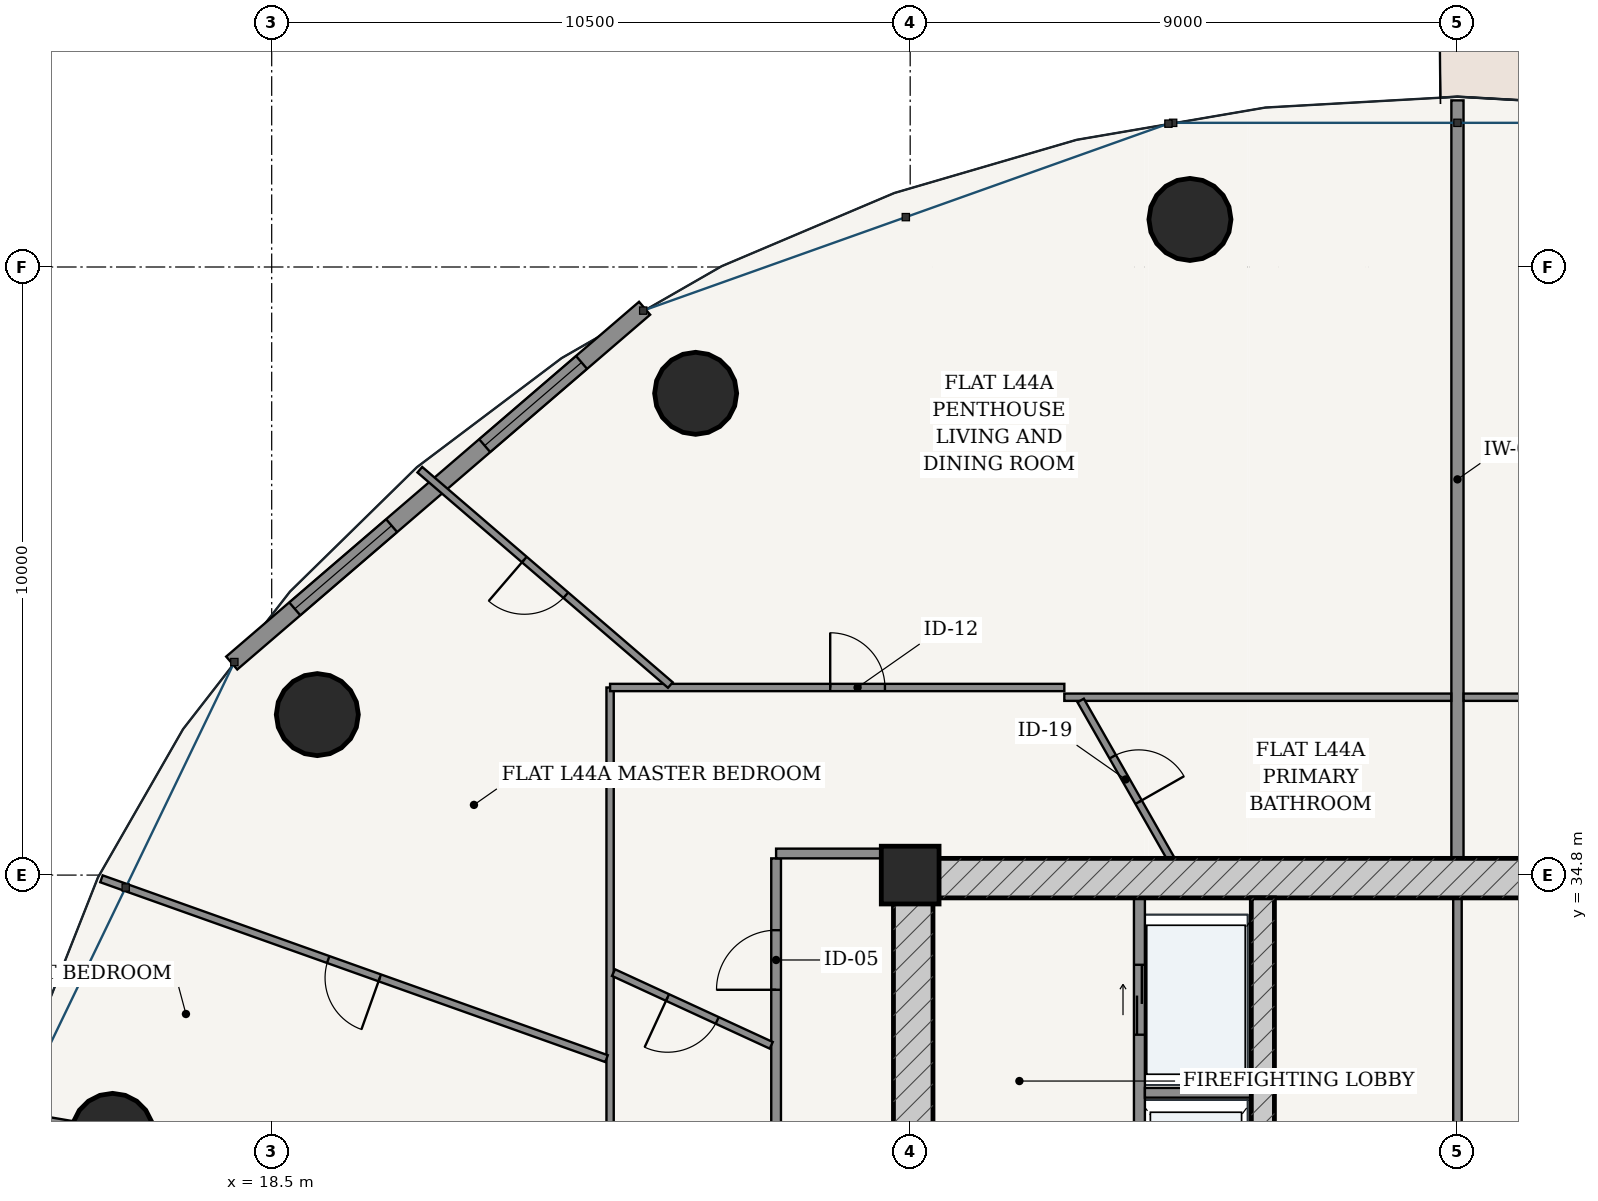
"""IFC4 building model, lengths in metres.
Left out: names, types, materials, properties, quantities, classifications, styles, units other than length and angle.
Written with IfcOpenShell. Run it as: python <this file> out.ifc"""

import sys

from ifc_helpers import new_model, si_unit, direction, frame, frame_2d, origin, origin_2d, place, context, subcontext, project, spatial, rectangle, hollow_circle, extrude, source, transform, mapped, element, fill, save


model = new_model("IFC4")
c1 = context("Model", 3, precision=1e-05, world=origin(), true_north=direction((-0.2419218956, 0.970295726276)))
c2 = subcontext(c1, "Body", "Model", "MODEL_VIEW")
j1 = project(units=[si_unit("LENGTHUNIT", "METRE"), si_unit("PLANEANGLEUNIT", "RADIAN")], contexts=[c1])
p1 = place(None, origin())
s1 = spatial("IfcSite", under=j1, at=p1, CompositionType="ELEMENT")
p2 = place(p1, origin())
s2 = spatial("IfcBuilding", under=s1, at=p2, CompositionType="ELEMENT")
p3 = place(p2, frame((0.0, 0.0, 167.8)))
s3 = spatial("IfcBuildingStorey", under=s2, at=p3, CompositionType="ELEMENT", Elevation=167.8)
p4 = place(p3, frame((29.0, 34.8, 0.0), z_axis=(0.0, 0.0, 1.0), x_axis=(1.0, 0.0, 0.0)))
e1 = element("IfcColumn", 1, at=p4, inside=s3, PredefinedType="COLUMN", context=c2, shape_type="SweptSolid", body=[
    extrude(rectangle(XDim=0.95, YDim=0.95, at=origin_2d()), origin(), (0.0, 0.0, 1.0), 3.6),
])
p5 = place(p3, frame((28.725, 34.75, 0.0), z_axis=(0.0, 0.0, 1.0), x_axis=(1.0, 0.0, 0.0)))
e2 = element("IfcWall", 2, at=p5, inside=s3, PredefinedType="SHEAR", context=c2, shape_type="SweptSolid", body=[
    extrude(rectangle(XDim=18.55, YDim=0.65, at=frame_2d((9.275, 0.0))), origin(), (0.0, 0.0, 1.0), 3.33),
])
p6 = place(p3, frame((29.05, 19.175, 0.0), z_axis=(0.0, 0.0, 1.0), x_axis=(0.0, 1.0, 0.0)))
e3 = element("IfcWall", 3, at=p6, inside=s3, PredefinedType="SHEAR", context=c2, shape_type="SweptSolid", body=[
    extrude(rectangle(XDim=15.25, YDim=0.65, at=frame_2d((7.625, 0.0))), origin(), (0.0, 0.0, 1.0), 3.33),
])
p7 = place(p6, frame((9.875, 0.0, 0.0)))
e4 = element("IfcOpeningElement", 4, at=p7, cuts=e3, PredefinedType="OPENING", context=c2, shape_type="SweptSolid", body=[
    extrude(rectangle(XDim=1.5, YDim=2.2, at=frame_2d((0.75, 1.1))), frame((0.0, 0.335, 0.0), z_axis=(0.0, -1.0, 0.0), x_axis=(1.0, 0.0, 0.0)), (0.0, 0.0, 1.0), 0.67),
])
p8 = place(p3, frame((34.8, 19.175, 0.0), z_axis=(0.0, 0.0, 1.0), x_axis=(0.0, 1.0, 0.0)))
e5 = element("IfcWall", 5, at=p8, inside=s3, PredefinedType="SHEAR", context=c2, shape_type="SweptSolid", body=[
    extrude(rectangle(XDim=15.25, YDim=0.38, at=frame_2d((7.625, 0.0))), origin(), (0.0, 0.0, 1.0), 3.33),
])
p9 = place(p8, frame((7.8, 0.0, 0.0)))
e6 = element("IfcOpeningElement", 6, at=p9, cuts=e5, PredefinedType="OPENING", context=c2, shape_type="SweptSolid", body=[
    extrude(rectangle(XDim=1.05, YDim=2.15, at=frame_2d((0.525, 1.075))), frame((0.0, 0.2, 0.0), z_axis=(0.0, -1.0, 0.0), x_axis=(1.0, 0.0, 0.0)), (0.0, 0.0, 1.0), 0.4),
])
for number, where, z_axis, x_axis in (
    (7, (33.601, 45.582, 0.0), (0.0, 0.0, 1.0), (1.0, 0.0, 0.0)),
    (8, (25.472, 42.723, 0.0), (0.0, 0.0, 1.0), (1.0, 0.0, 0.0)),
    (9, (19.25, 37.439, 0.0), (0.0, 0.0, 1.0), (1.0, 0.0, 0.0)),
    (10, (15.883, 30.536, 0.0), (0.0, 0.0, 1.0), (1.0, 0.0, 0.0)),
):
    element("IfcColumn", number, at=place(p3, frame(where, z_axis=z_axis, x_axis=x_axis)), inside=s3, PredefinedType="COLUMN", context=c2, shape_type="SweptSolid", body=[
        extrude(hollow_circle(Radius=0.675, WallThickness=0.042, at=origin_2d()), origin(), (0.0, 0.0, 1.0), 3.6),
    ])
p10 = place(p3, frame((24.633, 44.122, 0.0), z_axis=(0.0, 0.0, 1.0), x_axis=(-0.75843401647, -0.651749831348, 0.0)))
e11 = element("IfcWall", 11, at=p10, inside=s3, PredefinedType="SOLIDWALL", context=c2, shape_type="SweptSolid", body=[
    extrude(rectangle(XDim=8.952, YDim=0.28, at=frame_2d((4.476, 0.0))), origin(), (0.0, 0.0, 1.0), 3.33),
])
p11 = place(p10, frame((1.367, 0.0, 0.85)))
e12 = element("IfcOpeningElement", 12, at=p11, cuts=e11, PredefinedType="OPENING", context=c2, shape_type="SweptSolid", body=[
    extrude(rectangle(XDim=2.1, YDim=1.95, at=frame_2d((1.05, 0.975))), frame((0.0, 0.15, 0.0), z_axis=(0.0, -1.0, 0.0), x_axis=(1.0, 0.0, 0.0)), (0.0, 0.0, 1.0), 0.3),
])
p12 = place(p10, frame((5.485, 0.0, 0.85)))
e13 = element("IfcOpeningElement", 13, at=p12, cuts=e11, PredefinedType="OPENING", context=c2, shape_type="SweptSolid", body=[
    extrude(rectangle(XDim=2.1, YDim=1.95, at=frame_2d((1.05, 0.975))), frame((0.0, 0.15, 0.0), z_axis=(0.0, -1.0, 0.0), x_axis=(1.0, 0.0, 0.0)), (0.0, 0.0, 1.0), 0.3),
])
p13 = place(p3, frame((32.77, 28.52, 0.0), z_axis=(0.0, 0.0, 1.0), x_axis=(0.0, 1.0, 0.0)))
e14 = element("IfcWall", 14, at=p13, inside=s3, PredefinedType="PARTITIONING", context=c2, shape_type="SweptSolid", body=[
    extrude(rectangle(XDim=5.905, YDim=0.18, at=frame_2d((2.953, 0.0))), origin(), (0.0, 0.0, 1.0), 3.33),
])
p14 = place(p13, frame((3.655, 0.0, 0.0)))
e15 = element("IfcOpeningElement", 15, at=p14, cuts=e14, PredefinedType="OPENING", context=c2, shape_type="SweptSolid", body=[
    extrude(rectangle(XDim=1.15, YDim=2.2, at=frame_2d((0.575, 1.1))), frame((0.0, 0.1, 0.0), z_axis=(0.0, -1.0, 0.0), x_axis=(1.0, 0.0, 0.0)), (0.0, 0.0, 1.0), 0.2),
])
p15 = place(p13, frame((0.73, 0.0, 0.0)))
e16 = element("IfcOpeningElement", 16, at=p15, cuts=e14, PredefinedType="OPENING", context=c2, shape_type="SweptSolid", body=[
    extrude(rectangle(XDim=1.2, YDim=2.25, at=frame_2d((0.6, 1.125))), frame((0.0, 0.1, 0.0), z_axis=(0.0, -1.0, 0.0), x_axis=(1.0, 0.0, 0.0)), (0.0, 0.0, 1.0), 0.2),
])
p16 = place(p3, frame((32.86, 31.22, 0.0), z_axis=(0.0, 0.0, 1.0), x_axis=(1.0, 0.0, 0.0)))
e17 = element("IfcWall", 17, at=p16, inside=s3, PredefinedType="PARTITIONING", context=c2, shape_type="SweptSolid", body=[
    extrude(rectangle(XDim=1.75, YDim=0.16, at=frame_2d((0.875, 0.0))), origin(), (0.0, 0.0, 1.0), 3.33),
])
p17 = place(p3, frame((38.0, 28.56, 0.0), z_axis=(0.0, 0.0, 1.0), x_axis=(0.0, 1.0, 0.0)))
e18 = element("IfcWall", 18, at=p17, inside=s3, PredefinedType="PARTITIONING", context=c2, shape_type="SweptSolid", body=[
    extrude(rectangle(XDim=5.865, YDim=0.14, at=frame_2d((2.933, 0.0))), origin(), (0.0, 0.0, 1.0), 3.33),
])
p18 = place(p3, frame((26.795, 24.4, 0.0), z_axis=(0.0, 0.0, 1.0), x_axis=(0.0, 1.0, 0.0)))
e19 = element("IfcWall", 19, at=p18, inside=s3, PredefinedType="PARTITIONING", context=c2, shape_type="SweptSolid", body=[
    extrude(rectangle(XDim=10.675, YDim=0.16, at=frame_2d((5.337, 0.0))), origin(), (0.0, 0.0, 1.0), 2.776),
])
p19 = place(p18, frame((8.514, 0.0, 0.0)))
e20 = element("IfcOpeningElement", 20, at=p19, cuts=e19, PredefinedType="OPENING", context=c2, shape_type="SweptSolid", body=[
    extrude(rectangle(XDim=0.98, YDim=2.2, at=frame_2d((0.49, 1.1))), frame((0.0, 0.09, 0.0), z_axis=(0.0, -1.0, 0.0), x_axis=(1.0, 0.0, 0.0)), (0.0, 0.0, 1.0), 0.18),
])
p20 = place(p3, frame((26.795, 35.155, 0.0), z_axis=(0.0, 0.0, 1.0), x_axis=(1.0, 0.0, 0.0)))
e21 = element("IfcWall", 21, at=p20, inside=s3, PredefinedType="PARTITIONING", context=c2, shape_type="SweptSolid", body=[
    extrude(rectangle(XDim=1.93, YDim=0.16, at=frame_2d((0.965, 0.0))), origin(), (0.0, 0.0, 1.0), 2.776),
])
p21 = place(p3, frame((38.0, 35.075, 0.0), z_axis=(0.0, 0.0, 1.0), x_axis=(0.0, 1.0, 0.0)))
e22 = element("IfcWall", 22, at=p21, inside=s3, PredefinedType="PARTITIONING", context=c2, shape_type="SweptSolid", body=[
    extrude(rectangle(XDim=12.465, YDim=0.2, at=frame_2d((6.232, 0.0))), origin(), (0.0, 0.0, 1.0), 2.415),
])
p22 = place(p3, frame((24.065, 21.59, 0.0), z_axis=(0.0, 0.0, 1.0), x_axis=(0.0, 1.0, 0.0)))
e23 = element("IfcWall", 23, at=p22, inside=s3, PredefinedType="PARTITIONING", context=c2, shape_type="SweptSolid", body=[
    extrude(rectangle(XDim=16.295, YDim=0.12, at=frame_2d((8.147, 0.0))), origin(), (0.0, 0.0, 1.0), 2.776),
])
p23 = place(p3, frame((24.065, 37.885, 0.0), z_axis=(0.0, 0.0, 1.0), x_axis=(1.0, 0.0, 0.0)))
e24 = element("IfcWall", 24, at=p23, inside=s3, PredefinedType="PARTITIONING", context=c2, shape_type="SweptSolid", body=[
    extrude(rectangle(XDim=7.47, YDim=0.12, at=frame_2d((3.735, 0.0))), origin(), (0.0, 0.0, 1.0), 2.776),
])
p24 = place(p23, frame((3.62, 0.0, 0.0)))
e25 = element("IfcOpeningElement", 25, at=p24, cuts=e24, PredefinedType="OPENING", context=c2, shape_type="SweptSolid", body=[
    extrude(rectangle(XDim=0.9, YDim=2.15, at=frame_2d((0.45, 1.075))), frame((0.0, 0.07, 0.0), z_axis=(0.0, -1.0, 0.0), x_axis=(1.0, 0.0, 0.0)), (0.0, 0.0, 1.0), 0.14),
])
p25 = place(p3, frame((31.535, 37.725, 0.0), z_axis=(0.0, 0.0, 1.0), x_axis=(1.0, 0.0, 0.0)))
e26 = element("IfcWall", 26, at=p25, inside=s3, PredefinedType="PARTITIONING", context=c2, shape_type="SweptSolid", body=[
    extrude(rectangle(XDim=6.363, YDim=0.12, at=frame_2d((3.182, 0.0))), origin(), (0.0, 0.0, 1.0), 2.776),
])
p26 = place(p3, frame((25.056, 37.925, 0.0), z_axis=(0.0, 0.0, 1.0), x_axis=(-0.758354915574, 0.65184186888, 0.0)))
e27 = element("IfcWall", 27, at=p26, inside=s3, PredefinedType="PARTITIONING", context=c2, shape_type="SweptSolid", body=[
    extrude(rectangle(XDim=5.432, YDim=0.12, at=frame_2d((2.716, 0.0))), origin(), (0.0, 0.0, 1.0), 2.846),
])
p27 = place(p26, frame((2.266, 0.0, 0.0)))
e28 = element("IfcOpeningElement", 28, at=p27, cuts=e27, PredefinedType="OPENING", context=c2, shape_type="SweptSolid", body=[
    extrude(rectangle(XDim=0.9, YDim=2.15, at=frame_2d((0.45, 1.075))), frame((0.0, 0.07, 0.0), z_axis=(0.0, -1.0, 0.0), x_axis=(1.0, 0.0, 0.0)), (0.0, 0.0, 1.0), 0.14),
])
p28 = place(p3, frame((24.007, 31.782, 0.0), z_axis=(0.0, 0.0, 1.0), x_axis=(-0.942077868165, 0.335394231187, 0.0)))
e29 = element("IfcWall", 29, at=p28, inside=s3, PredefinedType="PARTITIONING", context=c2, shape_type="SweptSolid", body=[
    extrude(rectangle(XDim=8.817, YDim=0.12, at=frame_2d((4.408, 0.0))), origin(), (0.0, 0.0, 1.0), 2.846),
])
p29 = place(p28, frame((3.958, 0.0, 0.0)))
e30 = element("IfcOpeningElement", 30, at=p29, cuts=e29, PredefinedType="OPENING", context=c2, shape_type="SweptSolid", body=[
    extrude(rectangle(XDim=0.9, YDim=2.15, at=frame_2d((0.45, 1.075))), frame((0.0, 0.07, 0.0), z_axis=(0.0, -1.0, 0.0), x_axis=(1.0, 0.0, 0.0)), (0.0, 0.0, 1.0), 0.14),
])
p30 = place(p3, frame((24.004, 29.193, 0.0), z_axis=(0.0, 0.0, 1.0), x_axis=(-0.985698378271, 0.168519159369, 0.0)))
e31 = element("IfcWall", 31, at=p30, inside=s3, PredefinedType="PARTITIONING", context=c2, shape_type="SweptSolid", body=[
    extrude(rectangle(XDim=9.769, YDim=0.12, at=frame_2d((4.884, 0.0))), origin(), (0.0, 0.0, 1.0), 2.776),
])
p31 = place(p30, frame((3.428, 0.0, 0.0)))
e32 = element("IfcOpeningElement", 32, at=p31, cuts=e31, PredefinedType="OPENING", context=c2, shape_type="SweptSolid", body=[
    extrude(rectangle(XDim=0.9, YDim=2.15, at=frame_2d((0.45, 1.075))), frame((0.0, 0.07, 0.0), z_axis=(0.0, -1.0, 0.0), x_axis=(1.0, 0.0, 0.0)), (0.0, 0.0, 1.0), 0.14),
])
p32 = place(p3, frame((33.283, 35.075, 0.0), z_axis=(0.0, 0.0, 1.0), x_axis=(-0.495179611311, 0.868790626412, 0.0)))
e33 = element("IfcWall", 33, at=p32, inside=s3, PredefinedType="PARTITIONING", context=c2, shape_type="SweptSolid", body=[
    extrude(rectangle(XDim=2.988, YDim=0.12, at=frame_2d((1.494, 0.0))), origin(), (0.0, 0.0, 1.0), 3.33),
])
p33 = place(p32, frame((1.064, 0.0, 0.0)))
e34 = element("IfcOpeningElement", 34, at=p33, cuts=e33, PredefinedType="OPENING", context=c2, shape_type="SweptSolid", body=[
    extrude(rectangle(XDim=0.86, YDim=2.15, at=frame_2d((0.43, 1.075))), frame((0.0, 0.07, 0.0), z_axis=(0.0, -1.0, 0.0), x_axis=(1.0, 0.0, 0.0)), (0.0, 0.0, 1.0), 0.14),
])
p34 = place(p3, frame((26.715, 32.001, 0.0), z_axis=(0.0, 0.0, 1.0), x_axis=(-0.90819942915, 0.418537688735, 0.0)))
e35 = element("IfcWall", 35, at=p34, inside=s3, PredefinedType="PARTITIONING", context=c2, shape_type="SweptSolid", body=[
    extrude(rectangle(XDim=2.856, YDim=0.12, at=frame_2d((1.428, 0.0))), origin(), (0.0, 0.0, 1.0), 3.33),
])
p35 = place(p34, frame((0.978, 0.0, 0.0)))
e36 = element("IfcOpeningElement", 36, at=p35, cuts=e35, PredefinedType="OPENING", context=c2, shape_type="SweptSolid", body=[
    extrude(rectangle(XDim=0.9, YDim=2.15, at=frame_2d((0.45, 1.075))), frame((0.0, 0.07, 0.0), z_axis=(0.0, -1.0, 0.0), x_axis=(1.0, 0.0, 0.0)), (0.0, 0.0, 1.0), 0.14),
])
p36 = place(p3, frame((38.102, 37.725, 0.0), z_axis=(0.0, 0.0, 1.0), x_axis=(1.0, 0.0, 0.0)))
e37 = element("IfcWall", 37, at=p36, inside=s3, PredefinedType="PARTITIONING", context=c2, shape_type="SweptSolid", body=[
    extrude(rectangle(XDim=6.363, YDim=0.12, at=frame_2d((3.182, 0.0))), origin(), (0.0, 0.0, 1.0), 2.776),
])
m1 = source(origin(), c2, "Body", "SweptSolid", [
    extrude(rectangle(XDim=2.1, YDim=1.95, at=frame_2d((1.05, 0.975))), frame((0.0, 0.03, 0.0), z_axis=(0.0, -1.0, 0.0), x_axis=(1.0, 0.0, 0.0)), (0.0, 0.0, 1.0), 0.06),
])
p37 = place(p11, origin())
e38 = element("IfcWindow", 38, at=p37, inside=s3, PartitioningType="SINGLE_PANEL", PredefinedType="WINDOW", context=c2, shape_type="MappedRepresentation", body=[
    mapped(m1, transform((0.0, 0.0, 0.0), scale=1.0)),
])
fill(e12, e38)
p38 = place(p12, origin())
e39 = element("IfcWindow", 39, at=p38, inside=s3, PartitioningType="SINGLE_PANEL", PredefinedType="WINDOW", context=c2, shape_type="MappedRepresentation", body=[
    mapped(m1, transform((0.0, 0.0, 0.0), scale=1.0)),
])
fill(e13, e39)
m2 = source(origin(), c2, "Body", "SweptSolid", [
    extrude(rectangle(XDim=1.15, YDim=2.2, at=frame_2d((0.575, 1.1))), frame((0.0, 0.025, 0.0), z_axis=(0.0, -1.0, 0.0), x_axis=(1.0, 0.0, 0.0)), (0.0, 0.0, 1.0), 0.05),
])
p39 = place(p14, origin())
e40 = element("IfcDoor", 40, at=p39, inside=s3, OperationType="DOUBLE_DOOR_SLIDING", PredefinedType="DOOR", context=c2, shape_type="MappedRepresentation", body=[
    mapped(m2, transform((0.0, 0.0, 0.0), scale=1.0)),
])
fill(e15, e40)
m3 = source(origin(), c2, "Body", "SweptSolid", [
    extrude(rectangle(XDim=0.98, YDim=2.2, at=frame_2d((0.49, 1.1))), frame((0.0, 0.025, 0.0), z_axis=(0.0, -1.0, 0.0), x_axis=(1.0, 0.0, 0.0)), (0.0, 0.0, 1.0), 0.05),
])
p40 = place(p19, origin())
e41 = element("IfcDoor", 41, at=p40, inside=s3, OperationType="SINGLE_SWING_LEFT", PredefinedType="DOOR", context=c2, shape_type="MappedRepresentation", body=[
    mapped(m3, transform((0.0, 0.0, 0.0), scale=1.0)),
])
fill(e20, e41)
m4 = source(origin(), c2, "Body", "SweptSolid", [
    extrude(rectangle(XDim=0.86, YDim=2.15, at=frame_2d((0.43, 1.075))), frame((0.0, 0.025, 0.0), z_axis=(0.0, -1.0, 0.0), x_axis=(1.0, 0.0, 0.0)), (0.0, 0.0, 1.0), 0.05),
])
p41 = place(p33, frame((0.86, 0.0, 0.0), z_axis=(0.0, 0.0, 1.0), x_axis=(-1.0, 0.0, 0.0)))
e42 = element("IfcDoor", 42, at=p41, inside=s3, OperationType="SINGLE_SWING_RIGHT", PredefinedType="DOOR", context=c2, shape_type="MappedRepresentation", body=[
    mapped(m4, transform((0.0, 0.0, 0.0), scale=1.0)),
])
fill(e34, e42)
m5 = source(origin(), c2, "Body", "SweptSolid", [
    extrude(rectangle(XDim=0.9, YDim=2.15, at=frame_2d((0.45, 1.075))), frame((0.0, 0.025, 0.0), z_axis=(0.0, -1.0, 0.0), x_axis=(1.0, 0.0, 0.0)), (0.0, 0.0, 1.0), 0.05),
])
p42 = place(p24, origin())
e43 = element("IfcDoor", 43, at=p42, inside=s3, OperationType="SINGLE_SWING_LEFT", PredefinedType="DOOR", context=c2, shape_type="MappedRepresentation", body=[
    mapped(m5, transform((0.0, 0.0, 0.0), scale=1.0)),
])
fill(e25, e43)
p43 = place(p35, origin())
e44 = element("IfcDoor", 44, at=p43, inside=s3, OperationType="SINGLE_SWING_RIGHT", PredefinedType="DOOR", context=c2, shape_type="MappedRepresentation", body=[
    mapped(m5, transform((0.0, 0.0, 0.0), scale=1.0)),
])
fill(e36, e44)
p44 = place(p27, origin())
e45 = element("IfcDoor", 45, at=p44, inside=s3, OperationType="SINGLE_SWING_RIGHT", PredefinedType="DOOR", context=c2, shape_type="MappedRepresentation", body=[
    mapped(m5, transform((0.0, 0.0, 0.0), scale=1.0)),
])
fill(e28, e45)
p45 = place(p29, origin())
e46 = element("IfcDoor", 46, at=p45, inside=s3, OperationType="SINGLE_SWING_LEFT", PredefinedType="DOOR", context=c2, shape_type="MappedRepresentation", body=[
    mapped(m5, transform((0.0, 0.0, 0.0), scale=1.0)),
])
fill(e30, e46)
save(model, sys.argv[1])
